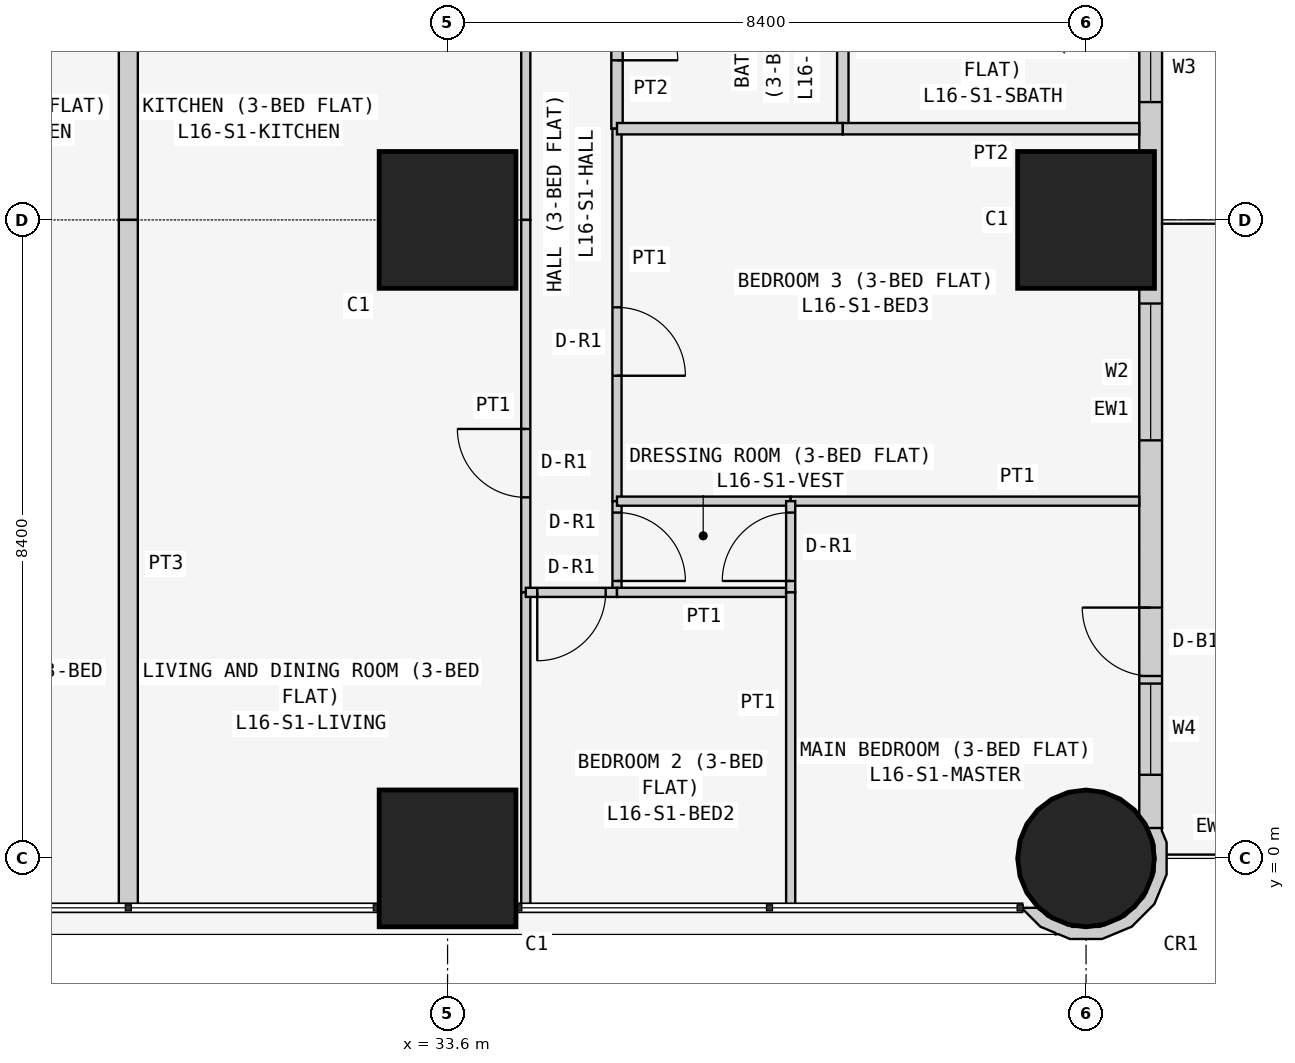
"""IFC4 building model, lengths in metres.
Left out: names, types, materials, properties, quantities, classifications, styles, units other than length and angle.
Written with IfcOpenShell. Run it as: python <this file> out.ifc"""

import sys

from ifc_helpers import new_model, si_unit, direction, frame, frame_2d, origin, origin_2d, place, context, subcontext, project, spatial, polyline, rectangle, circle, outline, extrude, element, fill, save


model = new_model("IFC4")
c1 = context("Model", 3, precision=1e-05, world=origin(), true_north=direction((0.0, 1.0)))
c2 = subcontext(c1, "Body", "Model", "MODEL_VIEW")
j1 = project(units=[si_unit("LENGTHUNIT", "METRE"), si_unit("PLANEANGLEUNIT", "RADIAN")], contexts=[c1])
p1 = place(None, origin())
s1 = spatial("IfcSite", under=j1, at=p1, CompositionType="ELEMENT")
p2 = place(p1, origin())
s2 = spatial("IfcBuilding", under=s1, at=p2, CompositionType="ELEMENT")
p3 = place(p2, frame((0.0, 0.0, 66.9)))
s3 = spatial("IfcBuildingStorey", under=s2, at=p3, CompositionType="ELEMENT", Elevation=66.9)
for number, where, z_axis, x_axis in (
    (1, (33.6, 0.0, 0.0), (0.0, 0.0, 1.0), (1.0, 0.0, 0.0)),
    (2, (33.6, 8.4, 0.0), (0.0, 0.0, 1.0), (1.0, 0.0, 0.0)),
):
    element("IfcColumn", number, at=place(p3, frame(where, z_axis=z_axis, x_axis=x_axis)), inside=s3, PredefinedType="COLUMN", context=c2, shape_type="SweptSolid", body=[
        extrude(rectangle(XDim=1.8, YDim=1.8, at=origin_2d()), origin(), (0.0, 0.0, 1.0), 3.6),
    ])
p4 = place(p3, frame((42.0, 0.0, 0.0), z_axis=(0.0, 0.0, 1.0), x_axis=(1.0, 0.0, 0.0)))
e3 = element("IfcColumn", 3, at=p4, inside=s3, PredefinedType="COLUMN", context=c2, shape_type="SweptSolid", body=[
    extrude(circle(Radius=0.9, at=origin_2d()), origin(), (0.0, 0.0, 1.0), 3.6),
])
p5 = place(p3, frame((42.0, 8.4, 0.0), z_axis=(0.0, 0.0, 1.0), x_axis=(1.0, 0.0, 0.0)))
e4 = element("IfcColumn", 4, at=p5, inside=s3, PredefinedType="COLUMN", context=c2, shape_type="SweptSolid", body=[
    extrude(rectangle(XDim=1.8, YDim=1.8, at=origin_2d()), origin(), (0.0, 0.0, 1.0), 3.6),
])
p6 = place(p3, frame((42.85, 0.4, 0.0), z_axis=(0.0, 0.0, 1.0), x_axis=(0.0, 1.0, 0.0)))
e5 = element("IfcWall", 5, at=p6, inside=s3, PredefinedType="SOLIDWALL", context=c2, shape_type="SweptSolid", body=[
    extrude(rectangle(XDim=15.7, YDim=0.3, at=frame_2d((7.85, 0.0))), origin(), (0.0, 0.0, 1.0), 3.45),
])
p7 = place(p6, frame((12.4, 0.0, 0.9)))
e6 = element("IfcOpeningElement", 6, at=p7, cuts=e5, PredefinedType="OPENING", context=c2, shape_type="SweptSolid", body=[
    extrude(rectangle(XDim=1.8, YDim=1.5, at=frame_2d((0.9, 0.75))), frame((0.0, 0.16, 0.0), z_axis=(0.0, -1.0, 0.0), x_axis=(1.0, 0.0, 0.0)), (0.0, 0.0, 1.0), 0.32),
])
p8 = place(p6, frame((9.55, 0.0, 1.5)))
e7 = element("IfcOpeningElement", 7, at=p8, cuts=e5, PredefinedType="OPENING", context=c2, shape_type="SweptSolid", body=[
    extrude(rectangle(XDim=0.9, YDim=0.7, at=frame_2d((0.45, 0.35))), frame((0.0, 0.16, 0.0), z_axis=(0.0, -1.0, 0.0), x_axis=(1.0, 0.0, 0.0)), (0.0, 0.0, 1.0), 0.32),
])
p9 = place(p6, frame((5.1, 0.0, 0.9)))
e8 = element("IfcOpeningElement", 8, at=p9, cuts=e5, PredefinedType="OPENING", context=c2, shape_type="SweptSolid", body=[
    extrude(rectangle(XDim=1.8, YDim=1.5, at=frame_2d((0.9, 0.75))), frame((0.0, 0.16, 0.0), z_axis=(0.0, -1.0, 0.0), x_axis=(1.0, 0.0, 0.0)), (0.0, 0.0, 1.0), 0.32),
])
p10 = place(p6, frame((2.0, 0.0, 0.0)))
e9 = element("IfcOpeningElement", 9, at=p10, cuts=e5, PredefinedType="OPENING", context=c2, shape_type="SweptSolid", body=[
    extrude(rectangle(XDim=0.9, YDim=2.4, at=frame_2d((0.45, 1.2))), frame((0.0, 0.16, 0.0), z_axis=(0.0, -1.0, 0.0), x_axis=(1.0, 0.0, 0.0)), (0.0, 0.0, 1.0), 0.32),
])
p11 = place(p6, frame((0.7, 0.0, 0.9)))
e10 = element("IfcOpeningElement", 10, at=p11, cuts=e5, PredefinedType="OPENING", context=c2, shape_type="SweptSolid", body=[
    extrude(rectangle(XDim=1.2, YDim=1.5, at=frame_2d((0.6, 0.75))), frame((0.0, 0.16, 0.0), z_axis=(0.0, -1.0, 0.0), x_axis=(1.0, 0.0, 0.0)), (0.0, 0.0, 1.0), 0.32),
])
p12 = place(p3, frame((41.233, -0.611, 0.0), z_axis=(0.0, 0.0, 1.0), x_axis=(0.377204953059, -0.926129809145, 0.0)))
e11 = element("IfcWall", 11, at=p12, inside=s3, PredefinedType="SOLIDWALL", context=c2, shape_type="SweptSolid", body=[
    extrude(outline(polyline([(0.319, 1.843), (-0.072, 2.001), (-0.24, 2.001), (-0.269, 2.017), (-0.37, 1.841), (-0.102, 1.842), (0.23, 1.707), (0.485, 1.455), (0.624, 1.125), (0.626, 0.766), (0.49, 0.434), (0.239, 0.179), (0.09, 0.117), (0.011, -0.078), (0.024, -0.083), (0.33, 0.045), (0.48, 0.197), (0.499, 0.193), (0.508, 0.225), (0.626, 0.345), (0.785, 0.736), (0.782, 1.157), (0.619, 1.546), (0.319, 1.843)])), origin(), (0.0, 0.0, 1.0), 3.45),
])
p13 = place(p3, frame((34.629, 8.4, 0.0), z_axis=(0.0, 0.0, 1.0), x_axis=(0.0, 1.0, 0.0)))
e12 = element("IfcWall", 12, at=p13, inside=s3, PredefinedType="PARTITIONING", context=c2, shape_type="SweptSolid", body=[
    extrude(rectangle(XDim=2.4, YDim=0.12, at=frame_2d((1.2, 0.0))), origin(), (0.0, 0.0, 1.0), 3.45),
])
p14 = place(p3, frame((29.4, 10.8, 0.0), z_axis=(0.0, 0.0, 1.0), x_axis=(0.0, -1.0, 0.0)))
e13 = element("IfcWall", 13, at=p14, inside=s3, PredefinedType="PARTITIONING", context=c2, shape_type="SweptSolid", body=[
    extrude(rectangle(XDim=2.4, YDim=0.25, at=frame_2d((1.2, 0.0))), origin(), (0.0, 0.0, 1.0), 2.848),
])
p15 = place(p3, frame((34.629, 3.5, 0.0), z_axis=(0.0, 0.0, 1.0), x_axis=(0.0, 1.0, 0.0)))
e14 = element("IfcWall", 14, at=p15, inside=s3, PredefinedType="PARTITIONING", context=c2, shape_type="SweptSolid", body=[
    extrude(rectangle(XDim=4.9, YDim=0.12, at=frame_2d((2.45, 0.0))), origin(), (0.0, 0.0, 1.0), 3.45),
])
p16 = place(p15, frame((1.25, 0.0, 0.0)))
e15 = element("IfcOpeningElement", 15, at=p16, cuts=e14, PredefinedType="OPENING", context=c2, shape_type="SweptSolid", body=[
    extrude(rectangle(XDim=0.9, YDim=2.1, at=frame_2d((0.45, 1.05))), frame((0.0, 0.07, 0.0), z_axis=(0.0, -1.0, 0.0), x_axis=(1.0, 0.0, 0.0)), (0.0, 0.0, 1.0), 0.14),
])
p17 = place(p3, frame((34.629, -0.65, 0.0), z_axis=(0.0, 0.0, 1.0), x_axis=(0.0, 1.0, 0.0)))
e16 = element("IfcWall", 16, at=p17, inside=s3, PredefinedType="PARTITIONING", context=c2, shape_type="SweptSolid", body=[
    extrude(rectangle(XDim=4.15, YDim=0.12, at=frame_2d((2.075, 0.0))), origin(), (0.0, 0.0, 1.0), 3.45),
])
p18 = place(p3, frame((29.4, 8.4, 0.0), z_axis=(0.0, 0.0, 1.0), x_axis=(0.0, -1.0, 0.0)))
e17 = element("IfcWall", 17, at=p18, inside=s3, PredefinedType="PARTITIONING", context=c2, shape_type="SweptSolid", body=[
    extrude(rectangle(XDim=9.05, YDim=0.25, at=frame_2d((4.525, 0.0))), origin(), (0.0, 0.0, 1.0), 2.848),
])
p19 = place(p3, frame((35.829, 9.6, 0.0), z_axis=(0.0, 0.0, 1.0), x_axis=(0.0, 1.0, 0.0)))
e18 = element("IfcWall", 18, at=p19, inside=s3, PredefinedType="PARTITIONING", context=c2, shape_type="SweptSolid", body=[
    extrude(rectangle(XDim=2.6, YDim=0.15, at=frame_2d((1.3, 0.0))), origin(), (0.0, 0.0, 1.0), 3.45),
])
p20 = place(p19, frame((0.9, 0.0, 0.0)))
e19 = element("IfcOpeningElement", 19, at=p20, cuts=e18, PredefinedType="OPENING", context=c2, shape_type="SweptSolid", body=[
    extrude(rectangle(XDim=0.8, YDim=2.1, at=frame_2d((0.4, 1.05))), frame((0.0, 0.085, 0.0), z_axis=(0.0, -1.0, 0.0), x_axis=(1.0, 0.0, 0.0)), (0.0, 0.0, 1.0), 0.17),
])
p21 = place(p3, frame((35.829, 4.7, 0.0), z_axis=(0.0, 0.0, 1.0), x_axis=(0.0, 1.0, 0.0)))
e20 = element("IfcWall", 20, at=p21, inside=s3, PredefinedType="PARTITIONING", context=c2, shape_type="SweptSolid", body=[
    extrude(rectangle(XDim=4.9, YDim=0.12, at=frame_2d((2.45, 0.0))), origin(), (0.0, 0.0, 1.0), 3.45),
])
p22 = place(p21, frame((1.65, 0.0, 0.0)))
e21 = element("IfcOpeningElement", 21, at=p22, cuts=e20, PredefinedType="OPENING", context=c2, shape_type="SweptSolid", body=[
    extrude(rectangle(XDim=0.9, YDim=2.1, at=frame_2d((0.45, 1.05))), frame((0.0, 0.07, 0.0), z_axis=(0.0, -1.0, 0.0), x_axis=(1.0, 0.0, 0.0)), (0.0, 0.0, 1.0), 0.14),
])
p23 = place(p3, frame((35.829, 3.5, 0.0), z_axis=(0.0, 0.0, 1.0), x_axis=(0.0, 1.0, 0.0)))
e22 = element("IfcWall", 22, at=p23, inside=s3, PredefinedType="PARTITIONING", context=c2, shape_type="SweptSolid", body=[
    extrude(rectangle(XDim=1.2, YDim=0.12, at=frame_2d((0.6, 0.0))), origin(), (0.0, 0.0, 1.0), 3.45),
])
p24 = place(p23, frame((0.15, 0.0, 0.0)))
e23 = element("IfcOpeningElement", 23, at=p24, cuts=e22, PredefinedType="OPENING", context=c2, shape_type="SweptSolid", body=[
    extrude(rectangle(XDim=0.9, YDim=2.1, at=frame_2d((0.45, 1.05))), frame((0.0, 0.07, 0.0), z_axis=(0.0, -1.0, 0.0), x_axis=(1.0, 0.0, 0.0)), (0.0, 0.0, 1.0), 0.14),
])
p25 = place(p3, frame((34.629, 3.5, 0.0), z_axis=(0.0, 0.0, 1.0), x_axis=(1.0, 0.0, 0.0)))
e24 = element("IfcWall", 24, at=p25, inside=s3, PredefinedType="PARTITIONING", context=c2, shape_type="SweptSolid", body=[
    extrude(rectangle(XDim=1.2, YDim=0.12, at=frame_2d((0.6, 0.0))), origin(), (0.0, 0.0, 1.0), 3.45),
])
p26 = place(p25, frame((0.151, 0.0, 0.0)))
e25 = element("IfcOpeningElement", 25, at=p26, cuts=e24, PredefinedType="OPENING", context=c2, shape_type="SweptSolid", body=[
    extrude(rectangle(XDim=0.9, YDim=2.1, at=frame_2d((0.45, 1.05))), frame((0.0, 0.07, 0.0), z_axis=(0.0, -1.0, 0.0), x_axis=(1.0, 0.0, 0.0)), (0.0, 0.0, 1.0), 0.14),
])
p27 = place(p3, frame((38.8, 9.6, 0.0), z_axis=(0.0, 0.0, 1.0), x_axis=(0.0, 1.0, 0.0)))
e26 = element("IfcWall", 26, at=p27, inside=s3, PredefinedType="PARTITIONING", context=c2, shape_type="SweptSolid", body=[
    extrude(rectangle(XDim=2.6, YDim=0.15, at=frame_2d((1.3, 0.0))), origin(), (0.0, 0.0, 1.0), 3.45),
])
p28 = place(p3, frame((35.829, 9.6, 0.0), z_axis=(0.0, 0.0, 1.0), x_axis=(1.0, 0.0, 0.0)))
e27 = element("IfcWall", 27, at=p28, inside=s3, PredefinedType="PARTITIONING", context=c2, shape_type="SweptSolid", body=[
    extrude(rectangle(XDim=2.971, YDim=0.15, at=frame_2d((1.485, 0.0))), origin(), (0.0, 0.0, 1.0), 3.45),
])
p29 = place(p3, frame((38.8, 9.6, 0.0), z_axis=(0.0, 0.0, 1.0), x_axis=(1.0, 0.0, 0.0)))
e28 = element("IfcWall", 28, at=p29, inside=s3, PredefinedType="PARTITIONING", context=c2, shape_type="SweptSolid", body=[
    extrude(rectangle(XDim=3.9, YDim=0.15, at=frame_2d((1.95, 0.0))), origin(), (0.0, 0.0, 1.0), 3.45),
])
p30 = place(p3, frame((35.829, 4.7, 0.0), z_axis=(0.0, 0.0, 1.0), x_axis=(1.0, 0.0, 0.0)))
e29 = element("IfcWall", 29, at=p30, inside=s3, PredefinedType="PARTITIONING", context=c2, shape_type="SweptSolid", body=[
    extrude(rectangle(XDim=2.285, YDim=0.12, at=frame_2d((1.143, 0.0))), origin(), (0.0, 0.0, 1.0), 3.45),
])
p31 = place(p3, frame((38.114, 4.7, 0.0), z_axis=(0.0, 0.0, 1.0), x_axis=(1.0, 0.0, 0.0)))
e30 = element("IfcWall", 30, at=p31, inside=s3, PredefinedType="PARTITIONING", context=c2, shape_type="SweptSolid", body=[
    extrude(rectangle(XDim=4.586, YDim=0.12, at=frame_2d((2.293, 0.0))), origin(), (0.0, 0.0, 1.0), 3.45),
])
p32 = place(p3, frame((35.829, 3.5, 0.0), z_axis=(0.0, 0.0, 1.0), x_axis=(1.0, 0.0, 0.0)))
e31 = element("IfcWall", 31, at=p32, inside=s3, PredefinedType="PARTITIONING", context=c2, shape_type="SweptSolid", body=[
    extrude(rectangle(XDim=2.285, YDim=0.12, at=frame_2d((1.143, 0.0))), origin(), (0.0, 0.0, 1.0), 3.45),
])
p33 = place(p3, frame((38.114, 3.5, 0.0), z_axis=(0.0, 0.0, 1.0), x_axis=(0.0, 1.0, 0.0)))
e32 = element("IfcWall", 32, at=p33, inside=s3, PredefinedType="PARTITIONING", context=c2, shape_type="SweptSolid", body=[
    extrude(rectangle(XDim=1.2, YDim=0.12, at=frame_2d((0.6, 0.0))), origin(), (0.0, 0.0, 1.0), 3.45),
])
p34 = place(p33, frame((0.15, 0.0, 0.0)))
e33 = element("IfcOpeningElement", 33, at=p34, cuts=e32, PredefinedType="OPENING", context=c2, shape_type="SweptSolid", body=[
    extrude(rectangle(XDim=0.9, YDim=2.1, at=frame_2d((0.45, 1.05))), frame((0.0, 0.07, 0.0), z_axis=(0.0, -1.0, 0.0), x_axis=(1.0, 0.0, 0.0)), (0.0, 0.0, 1.0), 0.14),
])
p35 = place(p3, frame((38.114, -0.65, 0.0), z_axis=(0.0, 0.0, 1.0), x_axis=(0.0, 1.0, 0.0)))
e34 = element("IfcWall", 34, at=p35, inside=s3, PredefinedType="PARTITIONING", context=c2, shape_type="SweptSolid", body=[
    extrude(rectangle(XDim=4.15, YDim=0.12, at=frame_2d((2.075, 0.0))), origin(), (0.0, 0.0, 1.0), 3.45),
])
p36 = place(p8, origin())
e35 = element("IfcWindow", 35, at=p36, inside=s3, PartitioningType="SINGLE_PANEL", PredefinedType="WINDOW", context=c2, shape_type="SweptSolid", body=[
    extrude(rectangle(XDim=0.9, YDim=0.7, at=frame_2d((0.45, 0.35))), frame((0.0, 0.03, 0.0), z_axis=(0.0, -1.0, 0.0), x_axis=(1.0, 0.0, 0.0)), (0.0, 0.0, 1.0), 0.06),
])
fill(e7, e35)
p37 = place(p9, origin())
e36 = element("IfcWindow", 36, at=p37, inside=s3, PartitioningType="SINGLE_PANEL", PredefinedType="WINDOW", context=c2, shape_type="SweptSolid", body=[
    extrude(rectangle(XDim=1.8, YDim=1.5, at=frame_2d((0.9, 0.75))), frame((0.0, 0.03, 0.0), z_axis=(0.0, -1.0, 0.0), x_axis=(1.0, 0.0, 0.0)), (0.0, 0.0, 1.0), 0.06),
])
fill(e8, e36)
p38 = place(p10, origin())
e37 = element("IfcDoor", 37, at=p38, inside=s3, OperationType="SINGLE_SWING_RIGHT", PredefinedType="DOOR", context=c2, shape_type="SweptSolid", body=[
    extrude(rectangle(XDim=0.9, YDim=2.4, at=frame_2d((0.45, 1.2))), frame((0.0, 0.025, 0.0), z_axis=(0.0, -1.0, 0.0), x_axis=(1.0, 0.0, 0.0)), (0.0, 0.0, 1.0), 0.05),
])
fill(e9, e37)
p39 = place(p11, origin())
e38 = element("IfcWindow", 38, at=p39, inside=s3, PartitioningType="SINGLE_PANEL", PredefinedType="WINDOW", context=c2, shape_type="SweptSolid", body=[
    extrude(rectangle(XDim=1.2, YDim=1.5, at=frame_2d((0.6, 0.75))), frame((0.0, 0.03, 0.0), z_axis=(0.0, -1.0, 0.0), x_axis=(1.0, 0.0, 0.0)), (0.0, 0.0, 1.0), 0.06),
])
fill(e10, e38)
p40 = place(p16, origin())
e39 = element("IfcDoor", 39, at=p40, inside=s3, OperationType="SINGLE_SWING_RIGHT", PredefinedType="DOOR", context=c2, shape_type="SweptSolid", body=[
    extrude(rectangle(XDim=0.9, YDim=2.1, at=frame_2d((0.45, 1.05))), frame((0.0, 0.025, 0.0), z_axis=(0.0, -1.0, 0.0), x_axis=(1.0, 0.0, 0.0)), (0.0, 0.0, 1.0), 0.05),
])
fill(e15, e39)
p41 = place(p20, frame((0.8, 0.0, 0.0), z_axis=(0.0, 0.0, 1.0), x_axis=(-1.0, 0.0, 0.0)))
e40 = element("IfcDoor", 40, at=p41, inside=s3, OperationType="SINGLE_SWING_RIGHT", PredefinedType="DOOR", context=c2, shape_type="SweptSolid", body=[
    extrude(rectangle(XDim=0.8, YDim=2.1, at=frame_2d((0.4, 1.05))), frame((0.0, 0.025, 0.0), z_axis=(0.0, -1.0, 0.0), x_axis=(1.0, 0.0, 0.0)), (0.0, 0.0, 1.0), 0.05),
])
fill(e19, e40)
p42 = place(p22, frame((0.9, 0.0, 0.0), z_axis=(0.0, 0.0, 1.0), x_axis=(-1.0, 0.0, 0.0)))
e41 = element("IfcDoor", 41, at=p42, inside=s3, OperationType="SINGLE_SWING_RIGHT", PredefinedType="DOOR", context=c2, shape_type="SweptSolid", body=[
    extrude(rectangle(XDim=0.9, YDim=2.1, at=frame_2d((0.45, 1.05))), frame((0.0, 0.025, 0.0), z_axis=(0.0, -1.0, 0.0), x_axis=(1.0, 0.0, 0.0)), (0.0, 0.0, 1.0), 0.05),
])
fill(e21, e41)
p43 = place(p24, frame((0.9, 0.0, 0.0), z_axis=(0.0, 0.0, 1.0), x_axis=(-1.0, 0.0, 0.0)))
e42 = element("IfcDoor", 42, at=p43, inside=s3, OperationType="SINGLE_SWING_RIGHT", PredefinedType="DOOR", context=c2, shape_type="SweptSolid", body=[
    extrude(rectangle(XDim=0.9, YDim=2.1, at=frame_2d((0.45, 1.05))), frame((0.0, 0.025, 0.0), z_axis=(0.0, -1.0, 0.0), x_axis=(1.0, 0.0, 0.0)), (0.0, 0.0, 1.0), 0.05),
])
fill(e23, e42)
p44 = place(p34, origin())
e43 = element("IfcDoor", 43, at=p44, inside=s3, OperationType="SINGLE_SWING_LEFT", PredefinedType="DOOR", context=c2, shape_type="SweptSolid", body=[
    extrude(rectangle(XDim=0.9, YDim=2.1, at=frame_2d((0.45, 1.05))), frame((0.0, 0.025, 0.0), z_axis=(0.0, -1.0, 0.0), x_axis=(1.0, 0.0, 0.0)), (0.0, 0.0, 1.0), 0.05),
])
fill(e33, e43)
p45 = place(p26, frame((0.9, 0.0, 0.0), z_axis=(0.0, 0.0, 1.0), x_axis=(-1.0, 0.0, 0.0)))
e44 = element("IfcDoor", 44, at=p45, inside=s3, OperationType="SINGLE_SWING_RIGHT", PredefinedType="DOOR", context=c2, shape_type="SweptSolid", body=[
    extrude(rectangle(XDim=0.9, YDim=2.1, at=frame_2d((0.45, 1.05))), frame((0.0, 0.025, 0.0), z_axis=(0.0, -1.0, 0.0), x_axis=(1.0, 0.0, 0.0)), (0.0, 0.0, 1.0), 0.05),
])
fill(e25, e44)
save(model, sys.argv[1])
